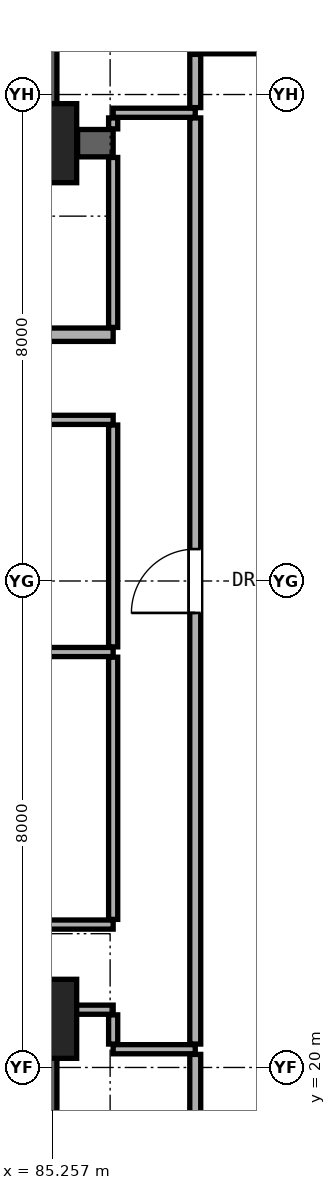
"""IFC4 building model, lengths in metres.
Left out: names, types, materials, properties, quantities, classifications, styles, units other than length and angle.
Written with IfcOpenShell. Run it as: python <this file> out.ifc"""

import sys

from ifc_helpers import new_model, si_unit, direction, frame, frame_2d, origin, origin_2d, place, context, subcontext, project, spatial, rectangle, extrude, element, fill, save


model = new_model("IFC4")
c1 = context("Model", 3, precision=1e-05, world=origin(), true_north=direction((0.0, 1.0)))
c2 = subcontext(c1, "Body", "Model", "MODEL_VIEW")
j1 = project(units=[si_unit("LENGTHUNIT", "METRE"), si_unit("PLANEANGLEUNIT", "RADIAN")], contexts=[c1])
p1 = place(None, origin())
s1 = spatial("IfcSite", under=j1, at=p1, CompositionType="ELEMENT")
p2 = place(p1, origin())
s2 = spatial("IfcBuilding", under=s1, at=p2, CompositionType="ELEMENT")
p3 = place(p2, frame((0.0, 0.0, 62.0)))
s3 = spatial("IfcBuildingStorey", under=s2, at=p3, CompositionType="ELEMENT", Elevation=62.0)
for number, where, z_axis, x_axis in (
    (1, (85.0, 20.8, 0.0), (0.0, 0.0, 1.0), (1.0, 0.0, 0.0)),
    (2, (85.0, 35.2, 0.0), (0.0, 0.0, 1.0), (1.0, 0.0, 0.0)),
):
    element("IfcColumn", number, at=place(p3, frame(where, z_axis=z_axis, x_axis=x_axis)), inside=s3, PredefinedType="COLUMN", context=c2, shape_type="SweptSolid", body=[
        extrude(rectangle(XDim=1.3, YDim=1.3, at=origin_2d()), origin(), (0.0, 0.0, 1.0), 3.3),
    ])
for number, where, z_axis, x_axis in (
    (3, (85.0, 35.2, 0.0), (0.0, 0.0, 1.0), (0.0, 1.0, 0.0)),
    (4, (85.0, 15.2, 0.0), (0.0, 0.0, 1.0), (0.0, 1.0, 0.0)),
):
    element("IfcWall", number, at=place(p3, frame(where, z_axis=z_axis, x_axis=x_axis)), inside=s3, PredefinedType="SHEAR", context=c2, shape_type="SweptSolid", body=[
        extrude(rectangle(XDim=5.6, YDim=0.65, at=frame_2d((2.8, 0.0))), origin(), (0.0, 0.0, 1.0), 3.06),
    ])
p4 = place(p3, frame((86.25, 20.3, 0.0), z_axis=(0.0, 0.0, 1.0), x_axis=(1.0, 0.0, 0.0)))
e5 = element("IfcWall", 5, at=p4, inside=s3, PredefinedType="PARTITIONING", context=c2, shape_type="SweptSolid", body=[
    extrude(rectangle(XDim=1.35, YDim=0.15, at=frame_2d((0.675, 0.0))), origin(), (0.0, 0.0, 1.0), 3.06),
])
p5 = place(p3, frame((85.32, 20.95, 0.0), z_axis=(0.0, 0.0, 1.0), x_axis=(1.0, 0.0, 0.0)))
e6 = element("IfcWall", 6, at=p5, inside=s3, PredefinedType="PARTITIONING", context=c2, shape_type="SweptSolid", body=[
    extrude(rectangle(XDim=0.93, YDim=0.15, at=frame_2d((0.465, 0.0))), origin(), (0.0, 0.0, 1.0), 2.452),
])
p6 = place(p3, frame((66.62, 22.35, 0.0), z_axis=(0.0, 0.0, 1.0), x_axis=(1.0, 0.0, 0.0)))
e7 = element("IfcWall", 7, at=p6, inside=s3, PredefinedType="PARTITIONING", context=c2, shape_type="SweptSolid", body=[
    extrude(rectangle(XDim=19.63, YDim=0.15, at=frame_2d((9.815, 0.0))), origin(), (0.0, 0.0, 1.0), 2.125),
])
p7 = place(p6, frame((12.085, 0.0, 0.0)))
e8 = element("IfcOpeningElement", 8, at=p7, cuts=e7, PredefinedType="OPENING", context=c2, shape_type="SweptSolid", body=[
    extrude(rectangle(XDim=0.85, YDim=2.01, at=frame_2d((0.425, 1.005))), frame((0.0, 0.085, 0.0), z_axis=(0.0, -1.0, 0.0), x_axis=(1.0, 0.0, 0.0)), (0.0, 0.0, 1.0), 0.17),
])
p8 = place(p3, frame((72.05, 26.832, 0.0), z_axis=(0.0, 0.0, 1.0), x_axis=(1.0, 0.0, 0.0)))
e9 = element("IfcWall", 9, at=p8, inside=s3, PredefinedType="PARTITIONING", context=c2, shape_type="SweptSolid", body=[
    extrude(rectangle(XDim=14.2, YDim=0.15, at=frame_2d((7.1, 0.0))), origin(), (0.0, 0.0, 1.0), 2.125),
])
p9 = place(p3, frame((66.62, 30.65, 0.0), z_axis=(0.0, 0.0, 1.0), x_axis=(1.0, 0.0, 0.0)))
e10 = element("IfcWall", 10, at=p9, inside=s3, PredefinedType="PARTITIONING", context=c2, shape_type="SweptSolid", body=[
    extrude(rectangle(XDim=19.63, YDim=0.15, at=frame_2d((9.815, 0.0))), origin(), (0.0, 0.0, 1.0), 2.125),
])
p10 = place(p9, frame((3.855, 0.0, 0.0)))
e11 = element("IfcOpeningElement", 11, at=p10, cuts=e10, PredefinedType="OPENING", context=c2, shape_type="SweptSolid", body=[
    extrude(rectangle(XDim=0.85, YDim=2.01, at=frame_2d((0.425, 1.005))), frame((0.0, 0.085, 0.0), z_axis=(0.0, -1.0, 0.0), x_axis=(1.0, 0.0, 0.0)), (0.0, 0.0, 1.0), 0.17),
])
p11 = place(p9, frame((12.085, 0.0, 0.0)))
e12 = element("IfcOpeningElement", 12, at=p11, cuts=e10, PredefinedType="OPENING", context=c2, shape_type="SweptSolid", body=[
    extrude(rectangle(XDim=0.85, YDim=2.01, at=frame_2d((0.425, 1.005))), frame((0.0, 0.085, 0.0), z_axis=(0.0, -1.0, 0.0), x_axis=(1.0, 0.0, 0.0)), (0.0, 0.0, 1.0), 0.17),
])
p12 = place(p3, frame((71.55, 32.05, 0.0), z_axis=(0.0, 0.0, 1.0), x_axis=(1.0, 0.0, 0.0)))
e13 = element("IfcWall", 13, at=p12, inside=s3, PredefinedType="SOLIDWALL", context=c2, shape_type="SweptSolid", body=[
    extrude(rectangle(XDim=14.7, YDim=0.22, at=frame_2d((7.35, 0.0))), origin(), (0.0, 0.0, 1.0), 2.125),
])
p13 = place(p12, frame((11.39, 0.0, 0.0)))
e14 = element("IfcOpeningElement", 14, at=p13, cuts=e13, PredefinedType="OPENING", context=c2, shape_type="SweptSolid", body=[
    extrude(rectangle(XDim=0.85, YDim=2.01, at=frame_2d((0.425, 1.005))), frame((0.0, 0.12, 0.0), z_axis=(0.0, -1.0, 0.0), x_axis=(1.0, 0.0, 0.0)), (0.0, 0.0, 1.0), 0.24),
])
p14 = place(p12, frame((6.065, 0.0, 0.0)))
e15 = element("IfcOpeningElement", 15, at=p14, cuts=e13, PredefinedType="OPENING", context=c2, shape_type="SweptSolid", body=[
    extrude(rectangle(XDim=0.85, YDim=2.01, at=frame_2d((0.425, 1.005))), frame((0.0, 0.12, 0.0), z_axis=(0.0, -1.0, 0.0), x_axis=(1.0, 0.0, 0.0)), (0.0, 0.0, 1.0), 0.24),
])
p15 = place(p12, frame((1.65, 0.0, 0.0)))
e16 = element("IfcOpeningElement", 16, at=p15, cuts=e13, PredefinedType="OPENING", context=c2, shape_type="SweptSolid", body=[
    extrude(rectangle(XDim=0.85, YDim=2.01, at=frame_2d((0.425, 1.005))), frame((0.0, 0.12, 0.0), z_axis=(0.0, -1.0, 0.0), x_axis=(1.0, 0.0, 0.0)), (0.0, 0.0, 1.0), 0.24),
])
p16 = place(p3, frame((85.665, 35.2, 0.0), z_axis=(0.0, 0.0, 1.0), x_axis=(1.0, 0.0, 0.0)))
e17 = element("IfcWall", 17, at=p16, inside=s3, PredefinedType="SHEAR", context=c2, shape_type="SweptSolid", body=[
    extrude(rectangle(XDim=0.585, YDim=0.45, at=frame_2d((0.292, 0.0))), origin(), (0.0, 0.0, 1.0), 3.06),
])
p17 = place(p3, frame((86.25, 35.7, 0.0), z_axis=(0.0, 0.0, 1.0), x_axis=(1.0, 0.0, 0.0)))
e18 = element("IfcWall", 18, at=p17, inside=s3, PredefinedType="PARTITIONING", context=c2, shape_type="SweptSolid", body=[
    extrude(rectangle(XDim=1.35, YDim=0.15, at=frame_2d((0.675, 0.0))), origin(), (0.0, 0.0, 1.0), 3.06),
])
p18 = place(p3, frame((87.6, 36.76, 0.0), z_axis=(0.0, 0.0, 1.0), x_axis=(1.0, 0.0, 0.0)))
e19 = element("IfcWall", 19, at=p18, inside=s3, PredefinedType="PARTITIONING", context=c2, shape_type="SweptSolid", body=[
    extrude(rectangle(XDim=7.054, YDim=0.18, at=frame_2d((3.527, 0.0))), origin(), (0.0, 0.0, 1.0), 2.436),
])
p19 = place(p18, frame((1.102, 0.0, 0.0)))
e20 = element("IfcOpeningElement", 20, at=p19, cuts=e19, PredefinedType="OPENING", context=c2, shape_type="SweptSolid", body=[
    extrude(rectangle(XDim=0.95, YDim=2.15, at=frame_2d((0.475, 1.075))), frame((0.0, 0.1, 0.0), z_axis=(0.0, -1.0, 0.0), x_axis=(1.0, 0.0, 0.0)), (0.0, 0.0, 1.0), 0.2),
])
p20 = place(p18, frame((5.564, 0.0, 0.0)))
e21 = element("IfcOpeningElement", 21, at=p20, cuts=e19, PredefinedType="OPENING", context=c2, shape_type="SweptSolid", body=[
    extrude(rectangle(XDim=0.9, YDim=2.1, at=frame_2d((0.45, 1.05))), frame((0.0, 0.1, 0.0), z_axis=(0.0, -1.0, 0.0), x_axis=(1.0, 0.0, 0.0)), (0.0, 0.0, 1.0), 0.2),
])
p21 = place(p3, frame((86.25, 20.385, 0.0), z_axis=(0.0, 0.0, 1.0), x_axis=(0.0, 1.0, 0.0)))
e22 = element("IfcWall", 22, at=p21, inside=s3, PredefinedType="PARTITIONING", context=c2, shape_type="SweptSolid", body=[
    extrude(rectangle(XDim=0.48, YDim=0.15, at=frame_2d((0.24, 0.0))), origin(), (0.0, 0.0, 1.0), 2.452),
])
p22 = place(p3, frame((86.25, 22.435, 0.0), z_axis=(0.0, 0.0, 1.0), x_axis=(0.0, 1.0, 0.0)))
e23 = element("IfcWall", 23, at=p22, inside=s3, PredefinedType="PARTITIONING", context=c2, shape_type="SweptSolid", body=[
    extrude(rectangle(XDim=4.312, YDim=0.15, at=frame_2d((2.156, 0.0))), origin(), (0.0, 0.0, 1.0), 3.06),
])
p23 = place(p3, frame((86.25, 26.917, 0.0), z_axis=(0.0, 0.0, 1.0), x_axis=(0.0, 1.0, 0.0)))
e24 = element("IfcWall", 24, at=p23, inside=s3, PredefinedType="PARTITIONING", context=c2, shape_type="SweptSolid", body=[
    extrude(rectangle(XDim=3.648, YDim=0.15, at=frame_2d((1.824, 0.0))), origin(), (0.0, 0.0, 1.0), 2.279),
])
p24 = place(p3, frame((86.25, 32.17, 0.0), z_axis=(0.0, 0.0, 1.0), x_axis=(0.0, 1.0, 0.0)))
e25 = element("IfcWall", 25, at=p24, inside=s3, PredefinedType="PARTITIONING", context=c2, shape_type="SweptSolid", body=[
    extrude(rectangle(XDim=2.795, YDim=0.15, at=frame_2d((1.397, 0.0))), origin(), (0.0, 0.0, 1.0), 2.452),
])
p25 = place(p3, frame((86.25, 35.435, 0.0), z_axis=(0.0, 0.0, 1.0), x_axis=(0.0, 1.0, 0.0)))
e26 = element("IfcWall", 26, at=p25, inside=s3, PredefinedType="PARTITIONING", context=c2, shape_type="SweptSolid", body=[
    extrude(rectangle(XDim=0.18, YDim=0.15, at=frame_2d((0.09, 0.0))), origin(), (0.0, 0.0, 1.0), 2.452),
])
p26 = place(p3, frame((87.6, 16.62, 0.0), z_axis=(0.0, 0.0, 1.0), x_axis=(0.0, 1.0, 0.0)))
e27 = element("IfcWall", 27, at=p26, inside=s3, PredefinedType="PARTITIONING", context=c2, shape_type="SweptSolid", body=[
    extrude(rectangle(XDim=3.595, YDim=0.18, at=frame_2d((1.797, 0.0))), origin(), (0.0, 0.0, 1.0), 2.436),
])
p27 = place(p3, frame((87.6, 20.385, 0.0), z_axis=(0.0, 0.0, 1.0), x_axis=(0.0, 1.0, 0.0)))
e28 = element("IfcWall", 28, at=p27, inside=s3, PredefinedType="PARTITIONING", context=c2, shape_type="SweptSolid", body=[
    extrude(rectangle(XDim=15.23, YDim=0.18, at=frame_2d((7.615, 0.0))), origin(), (0.0, 0.0, 1.0), 2.279),
])
p28 = place(p27, frame((7.09, 0.0, 0.0)))
e29 = element("IfcOpeningElement", 29, at=p28, cuts=e28, PredefinedType="OPENING", context=c2, shape_type="SweptSolid", body=[
    extrude(rectangle(XDim=1.05, YDim=2.2, at=frame_2d((0.525, 1.1))), frame((0.0, 0.1, 0.0), z_axis=(0.0, -1.0, 0.0), x_axis=(1.0, 0.0, 0.0)), (0.0, 0.0, 1.0), 0.2),
])
p29 = place(p3, frame((87.6, 35.785, 0.0), z_axis=(0.0, 0.0, 1.0), x_axis=(0.0, 1.0, 0.0)))
e30 = element("IfcWall", 30, at=p29, inside=s3, PredefinedType="PARTITIONING", context=c2, shape_type="SweptSolid", body=[
    extrude(rectangle(XDim=0.875, YDim=0.18, at=frame_2d((0.438, 0.0))), origin(), (0.0, 0.0, 1.0), 3.06),
])
p30 = place(p28, origin())
e31 = element("IfcDoor", 31, at=p30, inside=s3, OperationType="SINGLE_SWING_LEFT", PredefinedType="DOOR", context=c2, shape_type="SweptSolid", body=[
    extrude(rectangle(XDim=1.05, YDim=2.2, at=frame_2d((0.525, 1.1))), frame((0.0, 0.025, 0.0), z_axis=(0.0, -1.0, 0.0), x_axis=(1.0, 0.0, 0.0)), (0.0, 0.0, 1.0), 0.05),
])
fill(e29, e31)
save(model, sys.argv[1])
